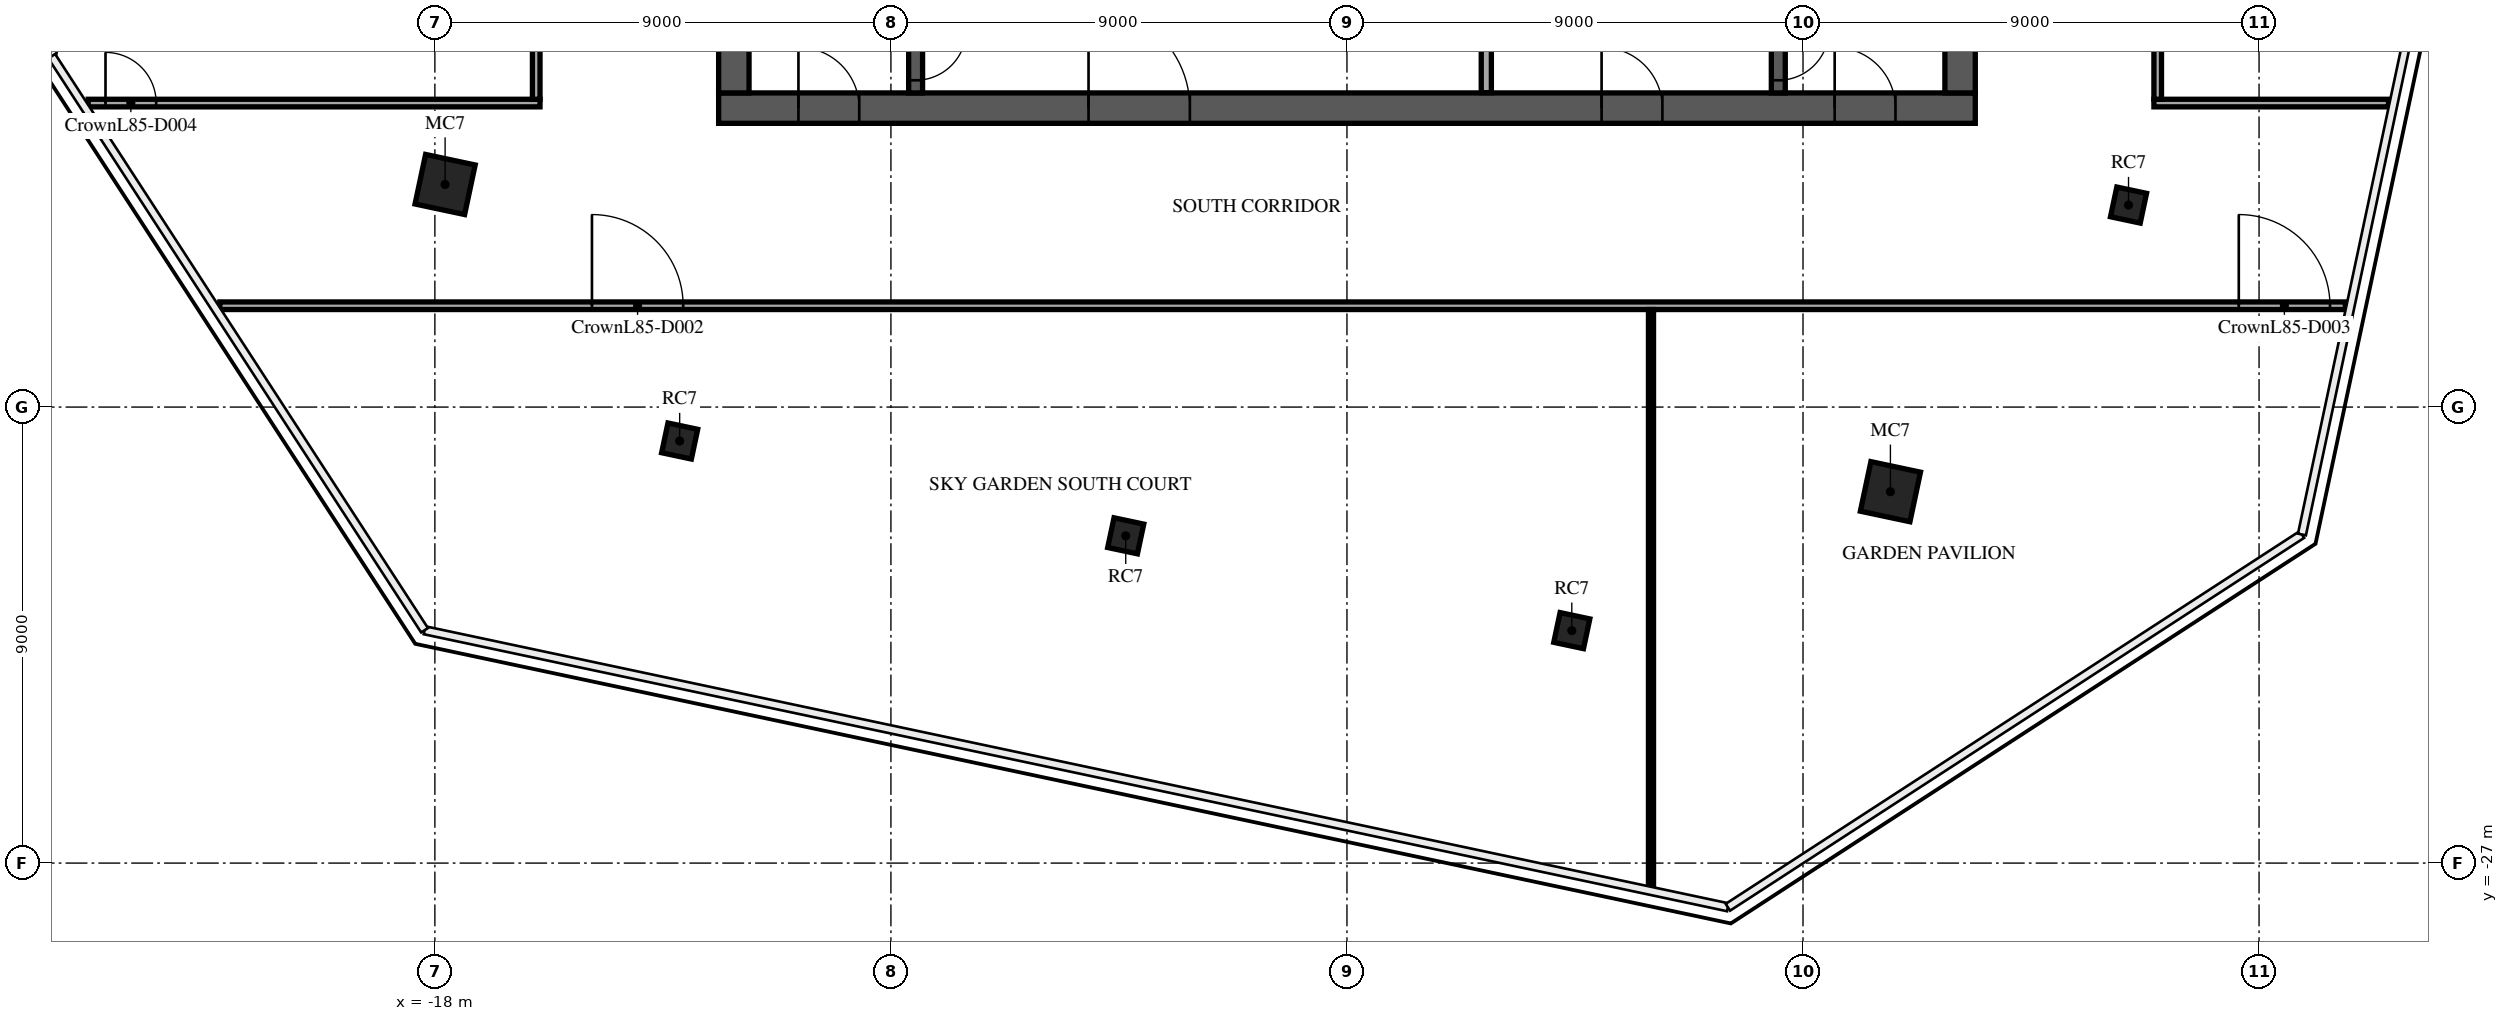
"""IFC4 building model, lengths in metres.
Left out: names, types, materials, properties, quantities, classifications, styles, units other than length and angle.
Written with IfcOpenShell. Run it as: python <this file> out.ifc"""

import sys

from ifc_helpers import new_model, si_unit, direction, frame, frame_2d, origin, origin_2d, place, context, subcontext, project, spatial, rectangle, extrude, element, fill, save


model = new_model("IFC4")
c1 = context("Model", 3, precision=1e-05, world=origin(), true_north=direction((0.0, 1.0)))
c2 = subcontext(c1, "Body", "Model", "MODEL_VIEW")
j1 = project(units=[si_unit("LENGTHUNIT", "METRE"), si_unit("PLANEANGLEUNIT", "RADIAN")], contexts=[c1])
p1 = place(None, origin())
s1 = spatial("IfcSite", under=j1, at=p1, CompositionType="ELEMENT")
p2 = place(p1, origin())
s2 = spatial("IfcBuilding", under=s1, at=p2, CompositionType="ELEMENT")
p3 = place(p2, frame((0.0, 0.0, 363.1)))
s3 = spatial("IfcBuildingStorey", under=s2, at=p3, CompositionType="ELEMENT", Elevation=363.1)
p4 = place(p3, frame((-17.798, -13.607, 0.0), z_axis=(0.0, 0.0, 1.0), x_axis=(0.207911690818, 0.978147600734, 0.0)))
e1 = element("IfcColumn", 1, at=p4, inside=s3, PredefinedType="COLUMN", context=c2, shape_type="SweptSolid", body=[
    extrude(rectangle(XDim=1.0, YDim=1.0, at=origin_2d()), origin(), (0.0, 0.0, 1.0), 5.0),
])
for number, where, z_axis, x_axis in (
    (2, (-13.169, -18.67, 0.0), (0.0, 0.0, 1.0), (0.208, 0.978, 0.0)),
    (3, (-4.366, -20.541, 0.0), (0.0, 0.0, 1.0), (0.208, 0.978, 0.0)),
    (4, (4.437, -22.412, 0.0), (0.0, 0.0, 1.0), (0.208, 0.978, 0.0)),
):
    element("IfcColumn", number, at=place(p3, frame(where, z_axis=z_axis, x_axis=x_axis)), inside=s3, PredefinedType="COLUMN", context=c2, shape_type="SweptSolid", body=[
        extrude(rectangle(XDim=0.6, YDim=0.6, at=origin_2d()), origin(), (0.0, 0.0, 1.0), 5.0),
    ])
p5 = place(p3, frame((10.725, -19.67, 0.0), z_axis=(0.0, 0.0, 1.0), x_axis=(0.207911690818, 0.978147600734, 0.0)))
e5 = element("IfcColumn", 5, at=p5, inside=s3, PredefinedType="COLUMN", context=c2, shape_type="SweptSolid", body=[
    extrude(rectangle(XDim=1.0, YDim=1.0, at=origin_2d()), origin(), (0.0, 0.0, 1.0), 5.0),
])
p6 = place(p3, frame((15.424, -14.013, 0.0), z_axis=(0.0, 0.0, 1.0), x_axis=(0.207911690818, 0.978147600734, 0.0)))
e6 = element("IfcColumn", 6, at=p6, inside=s3, PredefinedType="COLUMN", context=c2, shape_type="SweptSolid", body=[
    extrude(rectangle(XDim=0.6, YDim=0.6, at=origin_2d()), origin(), (0.0, 0.0, 1.0), 5.0),
])
p7 = place(p3, frame((-12.4, -12.1, 0.0), z_axis=(0.0, 0.0, 1.0), x_axis=(1.0, 0.0, 0.0)))
e7 = element("IfcWall", 7, at=p7, inside=s3, PredefinedType="SHEAR", context=c2, shape_type="SweptSolid", body=[
    extrude(rectangle(XDim=24.8, YDim=0.6, at=frame_2d((12.4, 0.0))), origin(), (0.0, 0.0, 1.0), 4.7),
])
p8 = place(p7, frame((7.3, 0.0, 0.0)))
e8 = element("IfcOpeningElement", 8, at=p8, cuts=e7, PredefinedType="OPENING", context=c2, shape_type="SweptSolid", body=[
    extrude(rectangle(XDim=2.0, YDim=2.1, at=frame_2d((1.0, 1.05))), frame((0.0, 0.31, 0.0), z_axis=(0.0, -1.0, 0.0), x_axis=(1.0, 0.0, 0.0)), (0.0, 0.0, 1.0), 0.62),
])
p9 = place(p7, frame((17.425, 0.0, 0.0)))
e9 = element("IfcOpeningElement", 9, at=p9, cuts=e7, PredefinedType="OPENING", context=c2, shape_type="SweptSolid", body=[
    extrude(rectangle(XDim=1.2, YDim=2.1, at=frame_2d((0.6, 1.05))), frame((0.0, 0.31, 0.0), z_axis=(0.0, -1.0, 0.0), x_axis=(1.0, 0.0, 0.0)), (0.0, 0.0, 1.0), 0.62),
])
p10 = place(p7, frame((1.575, 0.0, 0.0)))
e10 = element("IfcOpeningElement", 10, at=p10, cuts=e7, PredefinedType="OPENING", context=c2, shape_type="SweptSolid", body=[
    extrude(rectangle(XDim=1.2, YDim=2.1, at=frame_2d((0.6, 1.05))), frame((0.0, 0.31, 0.0), z_axis=(0.0, -1.0, 0.0), x_axis=(1.0, 0.0, 0.0)), (0.0, 0.0, 1.0), 0.62),
])
p11 = place(p7, frame((22.025, 0.0, 0.0)))
e11 = element("IfcOpeningElement", 11, at=p11, cuts=e7, PredefinedType="OPENING", context=c2, shape_type="SweptSolid", body=[
    extrude(rectangle(XDim=1.2, YDim=2.1, at=frame_2d((0.6, 1.05))), frame((0.0, 0.31, 0.0), z_axis=(0.0, -1.0, 0.0), x_axis=(1.0, 0.0, 0.0)), (0.0, 0.0, 1.0), 0.62),
])
p12 = place(p3, frame((12.1, -11.8, 0.0), z_axis=(0.0, 0.0, 1.0), x_axis=(0.0, 1.0, 0.0)))
e12 = element("IfcWall", 12, at=p12, inside=s3, PredefinedType="SHEAR", context=c2, shape_type="SweptSolid", body=[
    extrude(rectangle(XDim=23.6, YDim=0.6, at=frame_2d((11.8, 0.0))), origin(), (0.0, 0.0, 1.0), 4.7),
])
p13 = place(p12, frame((10.6, 0.0, 0.0)))
e13 = element("IfcOpeningElement", 13, at=p13, cuts=e12, PredefinedType="OPENING", context=c2, shape_type="SweptSolid", body=[
    extrude(rectangle(XDim=2.4, YDim=2.4, at=frame_2d((1.2, 1.2))), frame((0.0, 0.31, 0.0), z_axis=(0.0, -1.0, 0.0), x_axis=(1.0, 0.0, 0.0)), (0.0, 0.0, 1.0), 0.62),
])
p14 = place(p3, frame((-12.1, -11.8, 0.0), z_axis=(0.0, 0.0, 1.0), x_axis=(0.0, 1.0, 0.0)))
e14 = element("IfcWall", 14, at=p14, inside=s3, PredefinedType="SHEAR", context=c2, shape_type="SweptSolid", body=[
    extrude(rectangle(XDim=23.6, YDim=0.6, at=frame_2d((11.8, 0.0))), origin(), (0.0, 0.0, 1.0), 4.7),
])
p15 = place(p14, frame((10.6, 0.0, 0.0)))
e15 = element("IfcOpeningElement", 15, at=p15, cuts=e14, PredefinedType="OPENING", context=c2, shape_type="SweptSolid", body=[
    extrude(rectangle(XDim=2.4, YDim=2.4, at=frame_2d((1.2, 1.2))), frame((0.0, 0.31, 0.0), z_axis=(0.0, -1.0, 0.0), x_axis=(1.0, 0.0, 0.0)), (0.0, 0.0, 1.0), 0.62),
])
p16 = place(p3, frame((-8.512, -4.55, 0.0), z_axis=(0.0, 0.0, 1.0), x_axis=(0.0, -1.0, 0.0)))
e16 = element("IfcWall", 16, at=p16, inside=s3, PredefinedType="SOLIDWALL", context=c2, shape_type="SweptSolid", body=[
    extrude(rectangle(XDim=7.25, YDim=0.275, at=frame_2d((3.625, 0.0))), origin(), (0.0, 0.0, 1.0), 4.7),
])
p17 = place(p16, frame((6.0, 0.0, 0.0)))
e17 = element("IfcOpeningElement", 17, at=p17, cuts=e16, PredefinedType="OPENING", context=c2, shape_type="SweptSolid", body=[
    extrude(rectangle(XDim=1.0, YDim=2.1, at=frame_2d((0.5, 1.05))), frame((0.0, 0.147, 0.0), z_axis=(0.0, -1.0, 0.0), x_axis=(1.0, 0.0, 0.0)), (0.0, 0.0, 1.0), 0.295),
])
p18 = place(p3, frame((8.512, -4.55, 0.0), z_axis=(0.0, 0.0, 1.0), x_axis=(0.0, -1.0, 0.0)))
e18 = element("IfcWall", 18, at=p18, inside=s3, PredefinedType="SOLIDWALL", context=c2, shape_type="SweptSolid", body=[
    extrude(rectangle(XDim=7.25, YDim=0.275, at=frame_2d((3.625, 0.0))), origin(), (0.0, 0.0, 1.0), 4.7),
])
p19 = place(p18, frame((6.0, 0.0, 0.0)))
e19 = element("IfcOpeningElement", 19, at=p19, cuts=e18, PredefinedType="OPENING", context=c2, shape_type="SweptSolid", body=[
    extrude(rectangle(XDim=1.0, YDim=2.1, at=frame_2d((0.5, 1.05))), frame((0.0, 0.147, 0.0), z_axis=(0.0, -1.0, 0.0), x_axis=(1.0, 0.0, 0.0)), (0.0, 0.0, 1.0), 0.295),
])
p20 = place(p3, frame((2.75, -11.795, 0.0), z_axis=(0.0, 0.0, 1.0), x_axis=(0.0, 1.0, 0.0)))
e20 = element("IfcWall", 20, at=p20, inside=s3, PredefinedType="PARTITIONING", context=c2, shape_type="SweptSolid", body=[
    extrude(rectangle(XDim=2.99, YDim=0.2, at=frame_2d((1.495, 0.0))), origin(), (0.0, 0.0, 1.0), 4.7),
])
p21 = place(p3, frame((-22.244, -16.0, 0.0), z_axis=(0.0, 0.0, 1.0), x_axis=(1.0, 0.0, 0.0)))
e21 = element("IfcWall", 21, at=p21, inside=s3, PredefinedType="PARTITIONING", context=c2, shape_type="SweptSolid", body=[
    extrude(rectangle(XDim=41.948, YDim=0.15, at=frame_2d((20.974, 0.0))), origin(), (0.0, 0.0, 1.0), 4.7),
])
p22 = place(p21, frame((7.344, 0.0, 0.0)))
e22 = element("IfcOpeningElement", 22, at=p22, cuts=e21, PredefinedType="OPENING", context=c2, shape_type="SweptSolid", body=[
    extrude(rectangle(XDim=1.8, YDim=2.1, at=frame_2d((0.9, 1.05))), frame((0.0, 0.085, 0.0), z_axis=(0.0, -1.0, 0.0), x_axis=(1.0, 0.0, 0.0)), (0.0, 0.0, 1.0), 0.17),
])
p23 = place(p21, frame((39.844, 0.0, 0.0)))
e23 = element("IfcOpeningElement", 23, at=p23, cuts=e21, PredefinedType="OPENING", context=c2, shape_type="SweptSolid", body=[
    extrude(rectangle(XDim=1.8, YDim=2.1, at=frame_2d((0.9, 1.05))), frame((0.0, 0.085, 0.0), z_axis=(0.0, -1.0, 0.0), x_axis=(1.0, 0.0, 0.0)), (0.0, 0.0, 1.0), 0.17),
])
p24 = place(p3, frame((-24.842, -12.0, 0.0), z_axis=(0.0, 0.0, 1.0), x_axis=(1.0, 0.0, 0.0)))
e24 = element("IfcWall", 24, at=p24, inside=s3, PredefinedType="PARTITIONING", context=c2, shape_type="SweptSolid", body=[
    extrude(rectangle(XDim=8.917, YDim=0.15, at=frame_2d((4.458, 0.0))), origin(), (0.0, 0.0, 1.0), 4.7),
])
p25 = place(p24, frame((0.342, 0.0, 0.0)))
e25 = element("IfcOpeningElement", 25, at=p25, cuts=e24, PredefinedType="OPENING", context=c2, shape_type="SweptSolid", body=[
    extrude(rectangle(XDim=1.0, YDim=2.1, at=frame_2d((0.5, 1.05))), frame((0.0, 0.085, 0.0), z_axis=(0.0, -1.0, 0.0), x_axis=(1.0, 0.0, 0.0)), (0.0, 0.0, 1.0), 0.17),
])
p26 = place(p3, frame((15.925, -12.0, 0.0), z_axis=(0.0, 0.0, 1.0), x_axis=(1.0, 0.0, 0.0)))
e26 = element("IfcWall", 26, at=p26, inside=s3, PredefinedType="PARTITIONING", context=c2, shape_type="SweptSolid", body=[
    extrude(rectangle(XDim=4.629, YDim=0.15, at=frame_2d((2.314, 0.0))), origin(), (0.0, 0.0, 1.0), 4.7),
])
p27 = place(p3, frame((-16.0, -11.925, 0.0), z_axis=(0.0, 0.0, 1.0), x_axis=(0.0, 1.0, 0.0)))
e27 = element("IfcWall", 27, at=p27, inside=s3, PredefinedType="PARTITIONING", context=c2, shape_type="SweptSolid", body=[
    extrude(rectangle(XDim=7.875, YDim=0.15, at=frame_2d((3.938, 0.0))), origin(), (0.0, 0.0, 1.0), 4.7),
])
p28 = place(p3, frame((6.0, -27.447, 0.0), z_axis=(0.0, 0.0, 1.0), x_axis=(0.0, 1.0, 0.0)))
e28 = element("IfcWall", 28, at=p28, inside=s3, PredefinedType="PARTITIONING", context=c2, shape_type="SweptSolid", body=[
    extrude(rectangle(XDim=11.372, YDim=0.1, at=frame_2d((5.686, 0.0))), origin(), (0.0, 0.0, 1.0), 4.7),
])
p29 = place(p3, frame((16.0, -11.925, 0.0), z_axis=(0.0, 0.0, 1.0), x_axis=(0.0, 1.0, 0.0)))
e29 = element("IfcWall", 29, at=p29, inside=s3, PredefinedType="PARTITIONING", context=c2, shape_type="SweptSolid", body=[
    extrude(rectangle(XDim=23.85, YDim=0.15, at=frame_2d((11.925, 0.0))), origin(), (0.0, 0.0, 1.0), 4.23),
])
p30 = place(p29, frame((11.025, 0.0, 0.0)))
e30 = element("IfcOpeningElement", 30, at=p30, cuts=e29, PredefinedType="OPENING", context=c2, shape_type="SweptSolid", body=[
    extrude(rectangle(XDim=1.8, YDim=2.1, at=frame_2d((0.9, 1.05))), frame((0.0, 0.085, 0.0), z_axis=(0.0, -1.0, 0.0), x_axis=(1.0, 0.0, 0.0)), (0.0, 0.0, 1.0), 0.17),
])
p31 = place(p8, origin())
e31 = element("IfcDoor", 31, at=p31, inside=s3, OperationType="SINGLE_SWING_LEFT", PredefinedType="DOOR", context=c2, shape_type="SweptSolid", body=[
    extrude(rectangle(XDim=2.0, YDim=2.1, at=frame_2d((1.0, 1.05))), frame((0.0, 0.025, 0.0), z_axis=(0.0, -1.0, 0.0), x_axis=(1.0, 0.0, 0.0)), (0.0, 0.0, 1.0), 0.05),
])
fill(e8, e31)
p32 = place(p9, origin())
e32 = element("IfcDoor", 32, at=p32, inside=s3, OperationType="SINGLE_SWING_LEFT", PredefinedType="DOOR", context=c2, shape_type="SweptSolid", body=[
    extrude(rectangle(XDim=1.2, YDim=2.1, at=frame_2d((0.6, 1.05))), frame((0.0, 0.025, 0.0), z_axis=(0.0, -1.0, 0.0), x_axis=(1.0, 0.0, 0.0)), (0.0, 0.0, 1.0), 0.05),
])
fill(e9, e32)
p33 = place(p10, origin())
e33 = element("IfcDoor", 33, at=p33, inside=s3, OperationType="SINGLE_SWING_LEFT", PredefinedType="DOOR", context=c2, shape_type="SweptSolid", body=[
    extrude(rectangle(XDim=1.2, YDim=2.1, at=frame_2d((0.6, 1.05))), frame((0.0, 0.025, 0.0), z_axis=(0.0, -1.0, 0.0), x_axis=(1.0, 0.0, 0.0)), (0.0, 0.0, 1.0), 0.05),
])
fill(e10, e33)
p34 = place(p11, origin())
e34 = element("IfcDoor", 34, at=p34, inside=s3, OperationType="SINGLE_SWING_LEFT", PredefinedType="DOOR", context=c2, shape_type="SweptSolid", body=[
    extrude(rectangle(XDim=1.2, YDim=2.1, at=frame_2d((0.6, 1.05))), frame((0.0, 0.025, 0.0), z_axis=(0.0, -1.0, 0.0), x_axis=(1.0, 0.0, 0.0)), (0.0, 0.0, 1.0), 0.05),
])
fill(e11, e34)
p35 = place(p17, origin())
e35 = element("IfcDoor", 35, at=p35, inside=s3, OperationType="SINGLE_SWING_LEFT", PredefinedType="DOOR", context=c2, shape_type="SweptSolid", body=[
    extrude(rectangle(XDim=1.0, YDim=2.1, at=frame_2d((0.5, 1.05))), frame((0.0, 0.025, 0.0), z_axis=(0.0, -1.0, 0.0), x_axis=(1.0, 0.0, 0.0)), (0.0, 0.0, 1.0), 0.05),
])
fill(e17, e35)
p36 = place(p19, origin())
e36 = element("IfcDoor", 36, at=p36, inside=s3, OperationType="SINGLE_SWING_LEFT", PredefinedType="DOOR", context=c2, shape_type="SweptSolid", body=[
    extrude(rectangle(XDim=1.0, YDim=2.1, at=frame_2d((0.5, 1.05))), frame((0.0, 0.025, 0.0), z_axis=(0.0, -1.0, 0.0), x_axis=(1.0, 0.0, 0.0)), (0.0, 0.0, 1.0), 0.05),
])
fill(e19, e36)
p37 = place(p22, origin())
e37 = element("IfcDoor", 37, at=p37, inside=s3, OperationType="DOUBLE_DOOR_SINGLE_SWING", PredefinedType="DOOR", context=c2, shape_type="SweptSolid", body=[
    extrude(rectangle(XDim=1.8, YDim=2.1, at=frame_2d((0.9, 1.05))), frame((0.0, 0.025, 0.0), z_axis=(0.0, -1.0, 0.0), x_axis=(1.0, 0.0, 0.0)), (0.0, 0.0, 1.0), 0.05),
])
fill(e22, e37)
p38 = place(p23, origin())
e38 = element("IfcDoor", 38, at=p38, inside=s3, OperationType="DOUBLE_DOOR_SINGLE_SWING", PredefinedType="DOOR", context=c2, shape_type="SweptSolid", body=[
    extrude(rectangle(XDim=1.8, YDim=2.1, at=frame_2d((0.9, 1.05))), frame((0.0, 0.025, 0.0), z_axis=(0.0, -1.0, 0.0), x_axis=(1.0, 0.0, 0.0)), (0.0, 0.0, 1.0), 0.05),
])
fill(e23, e38)
p39 = place(p25, origin())
e39 = element("IfcDoor", 39, at=p39, inside=s3, OperationType="SINGLE_SWING_RIGHT", PredefinedType="DOOR", context=c2, shape_type="SweptSolid", body=[
    extrude(rectangle(XDim=1.0, YDim=2.1, at=frame_2d((0.5, 1.05))), frame((0.0, 0.025, 0.0), z_axis=(0.0, -1.0, 0.0), x_axis=(1.0, 0.0, 0.0)), (0.0, 0.0, 1.0), 0.05),
])
fill(e25, e39)
save(model, sys.argv[1])
